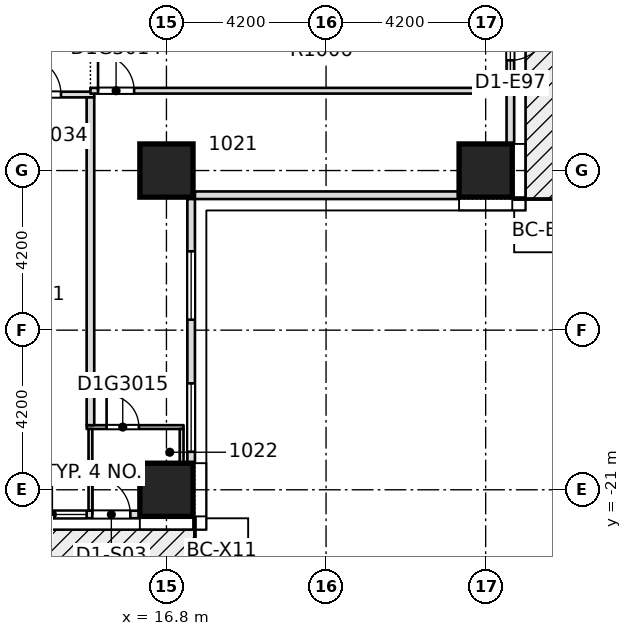
"""IFC4 building model, lengths in metres.
Left out: names, types, materials, properties, quantities, classifications, styles, units other than length and angle.
Written with IfcOpenShell. Run it as: python <this file> out.ifc"""

import sys

from ifc_helpers import new_model, si_unit, direction, frame, frame_2d, origin, origin_2d, place, context, subcontext, project, spatial, rectangle, extrude, element, fill, save


model = new_model("IFC4")
c1 = context("Model", 3, precision=1e-05, world=origin(), true_north=direction((0.0, 1.0)))
c2 = subcontext(c1, "Body", "Model", "MODEL_VIEW")
j1 = project(units=[si_unit("LENGTHUNIT", "METRE"), si_unit("PLANEANGLEUNIT", "RADIAN")], contexts=[c1])
p1 = place(None, origin())
s1 = spatial("IfcSite", under=j1, at=p1, CompositionType="ELEMENT")
p2 = place(p1, origin())
s2 = spatial("IfcBuilding", under=s1, at=p2, CompositionType="ELEMENT")
p3 = place(p2, frame((0.0, 0.0, 48.3)))
s3 = spatial("IfcBuildingStorey", under=s2, at=p3, CompositionType="ELEMENT", Elevation=48.3)
for number, where, z_axis, x_axis in (
    (1, (16.8, -21.0, -0.32), (0.0, 0.0, 1.0), (1.0, 0.0, 0.0)),
    (2, (16.8, -12.6, -0.32), (0.0, 0.0, 1.0), (1.0, 0.0, 0.0)),
    (3, (25.2, -12.6, -0.32), (0.0, 0.0, 1.0), (1.0, 0.0, 0.0)),
):
    element("IfcColumn", number, at=place(p3, frame(where, z_axis=z_axis, x_axis=x_axis)), inside=s3, PredefinedType="COLUMN", context=c2, shape_type="SweptSolid", body=[
        extrude(rectangle(XDim=1.4, YDim=1.4, at=origin_2d()), origin(), (0.0, 0.0, 1.0), 3.45),
    ])
p4 = place(p3, frame((14.7, -19.35, 0.0), z_axis=(0.0, 0.0, 1.0), x_axis=(1.0, 0.0, 0.0)))
e4 = element("IfcWall", 4, at=p4, inside=s3, PredefinedType="PARTITIONING", context=c2, shape_type="SweptSolid", body=[
    extrude(rectangle(XDim=2.55, YDim=0.1, at=frame_2d((1.275, 0.0))), origin(), (0.0, 0.0, 1.0), 3.13),
])
p5 = place(p4, frame((0.525, 0.0, 0.0)))
e5 = element("IfcOpeningElement", 5, at=p5, cuts=e4, PredefinedType="OPENING", context=c2, shape_type="SweptSolid", body=[
    extrude(rectangle(XDim=0.85, YDim=2.1, at=frame_2d((0.425, 1.05))), frame((0.0, 0.06, 0.0), z_axis=(0.0, -1.0, 0.0), x_axis=(1.0, 0.0, 0.0)), (0.0, 0.0, 1.0), 0.12),
])
p6 = place(p3, frame((8.5, -10.6, 0.0), z_axis=(0.0, 0.0, 1.0), x_axis=(1.0, 0.0, 0.0)))
e6 = element("IfcWall", 6, at=p6, inside=s3, PredefinedType="PARTITIONING", context=c2, shape_type="SweptSolid", body=[
    extrude(rectangle(XDim=6.4, YDim=0.15, at=frame_2d((3.2, 0.0))), origin(), (0.0, 0.0, 1.0), 3.13),
])
p7 = place(p6, frame((1.35, 0.0, 0.0)))
e7 = element("IfcOpeningElement", 7, at=p7, cuts=e6, PredefinedType="OPENING", context=c2, shape_type="SweptSolid", body=[
    extrude(rectangle(XDim=1.1, YDim=2.1, at=frame_2d((0.55, 1.05))), frame((0.0, 0.085, 0.0), z_axis=(0.0, -1.0, 0.0), x_axis=(1.0, 0.0, 0.0)), (0.0, 0.0, 1.0), 0.17),
])
p8 = place(p6, frame((4.525, 0.0, 0.0)))
e8 = element("IfcOpeningElement", 8, at=p8, cuts=e6, PredefinedType="OPENING", context=c2, shape_type="SweptSolid", body=[
    extrude(rectangle(XDim=1.0, YDim=2.1, at=frame_2d((0.5, 1.05))), frame((0.0, 0.085, 0.0), z_axis=(0.0, -1.0, 0.0), x_axis=(1.0, 0.0, 0.0)), (0.0, 0.0, 1.0), 0.17),
])
p9 = place(p3, frame((14.8, -10.5, 0.0), z_axis=(0.0, 0.0, 1.0), x_axis=(1.0, 0.0, 0.0)))
e9 = element("IfcWall", 9, at=p9, inside=s3, PredefinedType="PARTITIONING", context=c2, shape_type="SweptSolid", body=[
    extrude(rectangle(XDim=10.95, YDim=0.15, at=frame_2d((5.475, 0.0))), origin(), (0.0, 0.0, 1.0), 3.13),
])
p10 = place(p9, frame((0.2, 0.0, 0.0)))
e10 = element("IfcOpeningElement", 10, at=p10, cuts=e9, PredefinedType="OPENING", context=c2, shape_type="SweptSolid", body=[
    extrude(rectangle(XDim=0.95, YDim=2.1, at=frame_2d((0.475, 1.05))), frame((0.0, 0.085, 0.0), z_axis=(0.0, -1.0, 0.0), x_axis=(1.0, 0.0, 0.0)), (0.0, 0.0, 1.0), 0.17),
])
p11 = place(p3, frame((14.8, -21.55, 0.0), z_axis=(0.0, 0.0, 1.0), x_axis=(0.0, 1.0, 0.0)))
e11 = element("IfcWall", 11, at=p11, inside=s3, PredefinedType="PARTITIONING", context=c2, shape_type="SweptSolid", body=[
    extrude(rectangle(XDim=2.15, YDim=0.1, at=frame_2d((1.075, 0.0))), origin(), (0.0, 0.0, 1.0), 3.13),
])
p12 = place(p3, frame((14.8, -19.3, 0.0), z_axis=(0.0, 0.0, 1.0), x_axis=(0.0, 1.0, 0.0)))
e12 = element("IfcWall", 12, at=p12, inside=s3, PredefinedType="PARTITIONING", context=c2, shape_type="SweptSolid", body=[
    extrude(rectangle(XDim=8.625, YDim=0.2, at=frame_2d((4.312, 0.0))), origin(), (0.0, 0.0, 1.0), 3.13),
])
p13 = place(p3, frame((17.2, -21.55, 0.0), z_axis=(0.0, 0.0, 1.0), x_axis=(0.0, 1.0, 0.0)))
e13 = element("IfcWall", 13, at=p13, inside=s3, PredefinedType="PARTITIONING", context=c2, shape_type="SweptSolid", body=[
    extrude(rectangle(XDim=2.15, YDim=0.1, at=frame_2d((1.075, 0.0))), origin(), (0.0, 0.0, 1.0), 3.13),
])
p14 = place(p3, frame((9.1, -21.65, 0.0), z_axis=(0.0, 0.0, 1.0), x_axis=(1.0, 0.0, 0.0)))
e14 = element("IfcWall", 14, at=p14, inside=s3, PredefinedType="STANDARD", context=c2, shape_type="SweptSolid", body=[
    extrude(rectangle(XDim=7.0, YDim=0.2, at=frame_2d((3.5, 0.0))), origin(), (0.0, 0.0, 1.0), 3.13),
])
p15 = place(p14, frame((3.8, 0.0, 0.2)))
e15 = element("IfcOpeningElement", 15, at=p15, cuts=e14, PredefinedType="OPENING", context=c2, shape_type="SweptSolid", body=[
    extrude(rectangle(XDim=1.8, YDim=2.65, at=frame_2d((0.9, 1.325))), frame((0.0, 0.11, 0.0), z_axis=(0.0, -1.0, 0.0), x_axis=(1.0, 0.0, 0.0)), (0.0, 0.0, 1.0), 0.22),
])
p16 = place(p14, frame((5.75, 0.0, 0.0)))
e16 = element("IfcOpeningElement", 16, at=p16, cuts=e14, PredefinedType="OPENING", context=c2, shape_type="SweptSolid", body=[
    extrude(rectangle(XDim=1.0, YDim=2.4, at=frame_2d((0.5, 1.2))), frame((0.0, 0.11, 0.0), z_axis=(0.0, -1.0, 0.0), x_axis=(1.0, 0.0, 0.0)), (0.0, 0.0, 1.0), 0.22),
])
p17 = place(p3, frame((17.45, -20.3, 0.0), z_axis=(0.0, 0.0, 1.0), x_axis=(0.0, 1.0, 0.0)))
e17 = element("IfcWall", 17, at=p17, inside=s3, PredefinedType="STANDARD", context=c2, shape_type="SweptSolid", body=[
    extrude(rectangle(XDim=6.95, YDim=0.2, at=frame_2d((3.475, 0.0))), origin(), (0.0, 0.0, 1.0), 3.13),
])
p18 = place(p17, frame((0.3, 0.0, 0.2)))
e18 = element("IfcOpeningElement", 18, at=p18, cuts=e17, PredefinedType="OPENING", context=c2, shape_type="SweptSolid", body=[
    extrude(rectangle(XDim=1.8, YDim=2.65, at=frame_2d((0.9, 1.325))), frame((0.0, 0.11, 0.0), z_axis=(0.0, -1.0, 0.0), x_axis=(1.0, 0.0, 0.0)), (0.0, 0.0, 1.0), 0.22),
])
p19 = place(p17, frame((3.775, 0.0, 0.2)))
e19 = element("IfcOpeningElement", 19, at=p19, cuts=e17, PredefinedType="OPENING", context=c2, shape_type="SweptSolid", body=[
    extrude(rectangle(XDim=1.8, YDim=2.65, at=frame_2d((0.9, 1.325))), frame((0.0, 0.11, 0.0), z_axis=(0.0, -1.0, 0.0), x_axis=(1.0, 0.0, 0.0)), (0.0, 0.0, 1.0), 0.22),
])
p20 = place(p3, frame((17.55, -13.25, 0.0), z_axis=(0.0, 0.0, 1.0), x_axis=(1.0, 0.0, 0.0)))
e20 = element("IfcWall", 20, at=p20, inside=s3, PredefinedType="STANDARD", context=c2, shape_type="SweptSolid", body=[
    extrude(rectangle(XDim=6.95, YDim=0.2, at=frame_2d((3.475, 0.0))), origin(), (0.0, 0.0, 1.0), 3.13),
])
p21 = place(p3, frame((25.85, -11.9, 0.0), z_axis=(0.0, 0.0, 1.0), x_axis=(0.0, 1.0, 0.0)))
e21 = element("IfcWall", 21, at=p21, inside=s3, PredefinedType="STANDARD", context=c2, shape_type="SweptSolid", body=[
    extrude(rectangle(XDim=7.0, YDim=0.2, at=frame_2d((3.5, 0.0))), origin(), (0.0, 0.0, 1.0), 3.13),
])
p22 = place(p21, frame((2.2, 0.0, 0.0)))
e22 = element("IfcOpeningElement", 22, at=p22, cuts=e21, PredefinedType="OPENING", context=c2, shape_type="SweptSolid", body=[
    extrude(rectangle(XDim=1.0, YDim=2.4, at=frame_2d((0.5, 1.2))), frame((0.0, 0.11, 0.0), z_axis=(0.0, -1.0, 0.0), x_axis=(1.0, 0.0, 0.0)), (0.0, 0.0, 1.0), 0.22),
])
p23 = place(p21, frame((3.8, 0.0, 0.2)))
e23 = element("IfcOpeningElement", 23, at=p23, cuts=e21, PredefinedType="OPENING", context=c2, shape_type="SweptSolid", body=[
    extrude(rectangle(XDim=1.8, YDim=2.65, at=frame_2d((0.9, 1.325))), frame((0.0, 0.11, 0.0), z_axis=(0.0, -1.0, 0.0), x_axis=(1.0, 0.0, 0.0)), (0.0, 0.0, 1.0), 0.22),
])
p24 = place(p21, frame((5.7, 0.0, 0.0)))
e24 = element("IfcOpeningElement", 24, at=p24, cuts=e21, PredefinedType="OPENING", context=c2, shape_type="SweptSolid", body=[
    extrude(rectangle(XDim=1.0, YDim=2.4, at=frame_2d((0.5, 1.2))), frame((0.0, 0.11, 0.0), z_axis=(0.0, -1.0, 0.0), x_axis=(1.0, 0.0, 0.0)), (0.0, 0.0, 1.0), 0.22),
])
p25 = place(p10, origin())
e25 = element("IfcDoor", 25, at=p25, inside=s3, OperationType="SINGLE_SWING_RIGHT", PredefinedType="DOOR", context=c2, shape_type="SweptSolid", body=[
    extrude(rectangle(XDim=0.95, YDim=2.1, at=frame_2d((0.475, 1.05))), frame((0.0, 0.025, 0.0), z_axis=(0.0, -1.0, 0.0), x_axis=(1.0, 0.0, 0.0)), (0.0, 0.0, 1.0), 0.05),
])
fill(e10, e25)
p26 = place(p5, origin())
e26 = element("IfcDoor", 26, at=p26, inside=s3, OperationType="SINGLE_SWING_RIGHT", PredefinedType="DOOR", context=c2, shape_type="SweptSolid", body=[
    extrude(rectangle(XDim=0.85, YDim=2.1, at=frame_2d((0.425, 1.05))), frame((0.0, 0.025, 0.0), z_axis=(0.0, -1.0, 0.0), x_axis=(1.0, 0.0, 0.0)), (0.0, 0.0, 1.0), 0.05),
])
fill(e5, e26)
p27 = place(p8, origin())
e27 = element("IfcDoor", 27, at=p27, inside=s3, OperationType="SINGLE_SWING_RIGHT", PredefinedType="DOOR", context=c2, shape_type="SweptSolid", body=[
    extrude(rectangle(XDim=1.0, YDim=2.1, at=frame_2d((0.5, 1.05))), frame((0.0, 0.025, 0.0), z_axis=(0.0, -1.0, 0.0), x_axis=(1.0, 0.0, 0.0)), (0.0, 0.0, 1.0), 0.05),
])
fill(e8, e27)
p28 = place(p15, origin())
e28 = element("IfcWindow", 28, at=p28, inside=s3, PartitioningType="SINGLE_PANEL", PredefinedType="WINDOW", context=c2, shape_type="SweptSolid", body=[
    extrude(rectangle(XDim=1.8, YDim=2.65, at=frame_2d((0.9, 1.325))), frame((0.0, 0.03, 0.0), z_axis=(0.0, -1.0, 0.0), x_axis=(1.0, 0.0, 0.0)), (0.0, 0.0, 1.0), 0.06),
])
fill(e15, e28)
p29 = place(p16, origin())
e29 = element("IfcDoor", 29, at=p29, inside=s3, OperationType="SINGLE_SWING_LEFT", PredefinedType="DOOR", context=c2, shape_type="SweptSolid", body=[
    extrude(rectangle(XDim=1.0, YDim=2.4, at=frame_2d((0.5, 1.2))), frame((0.0, 0.025, 0.0), z_axis=(0.0, -1.0, 0.0), x_axis=(1.0, 0.0, 0.0)), (0.0, 0.0, 1.0), 0.05),
])
fill(e16, e29)
p30 = place(p18, origin())
e30 = element("IfcWindow", 30, at=p30, inside=s3, PartitioningType="SINGLE_PANEL", PredefinedType="WINDOW", context=c2, shape_type="SweptSolid", body=[
    extrude(rectangle(XDim=1.8, YDim=2.65, at=frame_2d((0.9, 1.325))), frame((0.0, 0.03, 0.0), z_axis=(0.0, -1.0, 0.0), x_axis=(1.0, 0.0, 0.0)), (0.0, 0.0, 1.0), 0.06),
])
fill(e18, e30)
p31 = place(p19, origin())
e31 = element("IfcWindow", 31, at=p31, inside=s3, PartitioningType="SINGLE_PANEL", PredefinedType="WINDOW", context=c2, shape_type="SweptSolid", body=[
    extrude(rectangle(XDim=1.8, YDim=2.65, at=frame_2d((0.9, 1.325))), frame((0.0, 0.03, 0.0), z_axis=(0.0, -1.0, 0.0), x_axis=(1.0, 0.0, 0.0)), (0.0, 0.0, 1.0), 0.06),
])
fill(e19, e31)
p32 = place(p22, origin())
e32 = element("IfcDoor", 32, at=p32, inside=s3, OperationType="SINGLE_SWING_LEFT", PredefinedType="DOOR", context=c2, shape_type="SweptSolid", body=[
    extrude(rectangle(XDim=1.0, YDim=2.4, at=frame_2d((0.5, 1.2))), frame((0.0, 0.025, 0.0), z_axis=(0.0, -1.0, 0.0), x_axis=(1.0, 0.0, 0.0)), (0.0, 0.0, 1.0), 0.05),
])
fill(e22, e32)
save(model, sys.argv[1])
